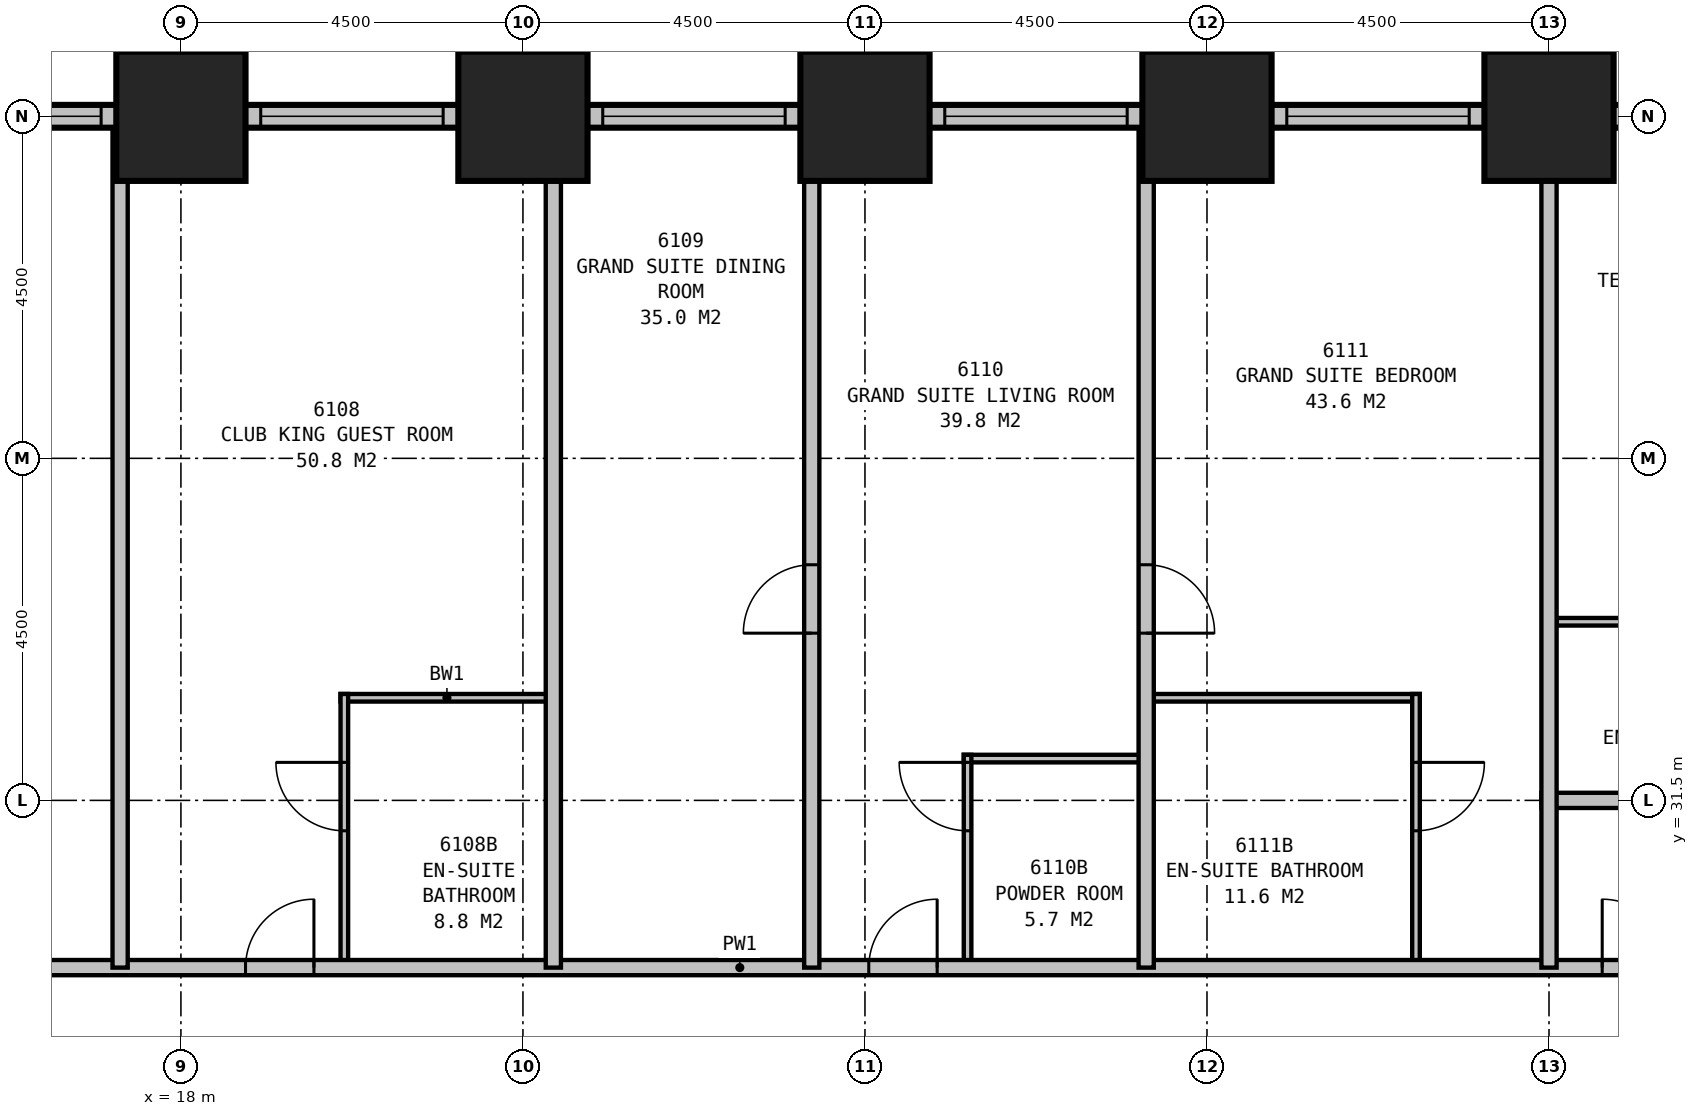
"""IFC4 building model, lengths in metres.
Left out: names, types, materials, properties, quantities, classifications, styles, units other than length and angle.
Written with IfcOpenShell. Run it as: python <this file> out.ifc"""

import sys

from ifc_helpers import new_model, si_unit, direction, frame, frame_2d, origin, origin_2d, place, context, subcontext, project, spatial, rectangle, extrude, element, fill, save


model = new_model("IFC4")
c1 = context("Model", 3, precision=1e-05, world=origin(), true_north=direction((0.0, 1.0)))
c2 = subcontext(c1, "Body", "Model", "MODEL_VIEW")
j1 = project(units=[si_unit("LENGTHUNIT", "METRE"), si_unit("PLANEANGLEUNIT", "RADIAN")], contexts=[c1])
p1 = place(None, origin())
s1 = spatial("IfcSite", under=j1, at=p1, CompositionType="ELEMENT")
p2 = place(p1, origin())
s2 = spatial("IfcBuilding", under=s1, at=p2, CompositionType="ELEMENT")
p3 = place(p2, frame((0.0, 0.0, 236.9)))
s3 = spatial("IfcBuildingStorey", under=s2, at=p3, CompositionType="ELEMENT", Elevation=236.9)
for number, where, z_axis, x_axis in (
    (1, (36.0, 40.5, 0.0), (0.0, 0.0, 1.0), (1.0, 0.0, 0.0)),
    (2, (31.5, 40.5, 0.0), (0.0, 0.0, 1.0), (1.0, 0.0, 0.0)),
    (3, (27.0, 40.5, 0.0), (0.0, 0.0, 1.0), (1.0, 0.0, 0.0)),
    (4, (22.5, 40.5, 0.0), (0.0, 0.0, 1.0), (1.0, 0.0, 0.0)),
    (5, (18.0, 40.5, 0.0), (0.0, 0.0, 1.0), (1.0, 0.0, 0.0)),
):
    element("IfcColumn", number, at=place(p3, frame(where, z_axis=z_axis, x_axis=x_axis)), inside=s3, PredefinedType="COLUMN", context=c2, shape_type="SweptSolid", body=[
        extrude(rectangle(XDim=1.7, YDim=1.7, at=origin_2d()), origin(), (0.0, 0.0, 1.0), 3.9),
    ])
p4 = place(p3, frame((40.65, 40.5, 0.0), z_axis=(0.0, 0.0, 1.0), x_axis=(-1.0, 0.0, 0.0)))
e6 = element("IfcWall", 6, at=p4, inside=s3, PredefinedType="STANDARD", context=c2, shape_type="SweptSolid", body=[
    extrude(rectangle(XDim=27.3, YDim=0.3, at=frame_2d((13.65, 0.0))), origin(), (0.0, 0.0, 1.0), 2.5),
])
p5 = place(p4, frame((1.2, 0.0, 0.5)))
e7 = element("IfcOpeningElement", 7, at=p5, cuts=e6, PredefinedType="OPENING", context=c2, shape_type="SweptSolid", body=[
    extrude(rectangle(XDim=2.4, YDim=1.85, at=frame_2d((1.2, 0.925))), frame((0.0, 0.16, 0.0), z_axis=(0.0, -1.0, 0.0), x_axis=(1.0, 0.0, 0.0)), (0.0, 0.0, 1.0), 0.32),
])
p6 = place(p4, frame((5.7, 0.0, 0.5)))
e8 = element("IfcOpeningElement", 8, at=p6, cuts=e6, PredefinedType="OPENING", context=c2, shape_type="SweptSolid", body=[
    extrude(rectangle(XDim=2.4, YDim=1.85, at=frame_2d((1.2, 0.925))), frame((0.0, 0.16, 0.0), z_axis=(0.0, -1.0, 0.0), x_axis=(1.0, 0.0, 0.0)), (0.0, 0.0, 1.0), 0.32),
])
p7 = place(p4, frame((10.2, 0.0, 0.5)))
e9 = element("IfcOpeningElement", 9, at=p7, cuts=e6, PredefinedType="OPENING", context=c2, shape_type="SweptSolid", body=[
    extrude(rectangle(XDim=2.4, YDim=1.85, at=frame_2d((1.2, 0.925))), frame((0.0, 0.16, 0.0), z_axis=(0.0, -1.0, 0.0), x_axis=(1.0, 0.0, 0.0)), (0.0, 0.0, 1.0), 0.32),
])
p8 = place(p4, frame((14.7, 0.0, 0.5)))
e10 = element("IfcOpeningElement", 10, at=p8, cuts=e6, PredefinedType="OPENING", context=c2, shape_type="SweptSolid", body=[
    extrude(rectangle(XDim=2.4, YDim=1.85, at=frame_2d((1.2, 0.925))), frame((0.0, 0.16, 0.0), z_axis=(0.0, -1.0, 0.0), x_axis=(1.0, 0.0, 0.0)), (0.0, 0.0, 1.0), 0.32),
])
p9 = place(p4, frame((19.2, 0.0, 0.5)))
e11 = element("IfcOpeningElement", 11, at=p9, cuts=e6, PredefinedType="OPENING", context=c2, shape_type="SweptSolid", body=[
    extrude(rectangle(XDim=2.4, YDim=1.85, at=frame_2d((1.2, 0.925))), frame((0.0, 0.16, 0.0), z_axis=(0.0, -1.0, 0.0), x_axis=(1.0, 0.0, 0.0)), (0.0, 0.0, 1.0), 0.32),
])
p10 = place(p4, frame((23.7, 0.0, 0.5)))
e12 = element("IfcOpeningElement", 12, at=p10, cuts=e6, PredefinedType="OPENING", context=c2, shape_type="SweptSolid", body=[
    extrude(rectangle(XDim=2.4, YDim=1.85, at=frame_2d((1.2, 0.925))), frame((0.0, 0.16, 0.0), z_axis=(0.0, -1.0, 0.0), x_axis=(1.0, 0.0, 0.0)), (0.0, 0.0, 1.0), 0.32),
])
p11 = place(p3, frame((12.406, 29.3, 0.0), z_axis=(0.0, 0.0, 1.0), x_axis=(1.0, 0.0, 0.0)))
e13 = element("IfcWall", 13, at=p11, inside=s3, PredefinedType="PARTITIONING", context=c2, shape_type="SweptSolid", body=[
    extrude(rectangle(XDim=25.894, YDim=0.2, at=frame_2d((12.947, 0.0))), origin(), (0.0, 0.0, 1.0), 3.65),
])
p12 = place(p11, frame((0.9, 0.0, 0.0)))
e14 = element("IfcOpeningElement", 14, at=p12, cuts=e13, PredefinedType="OPENING", context=c2, shape_type="SweptSolid", body=[
    extrude(rectangle(XDim=0.9, YDim=2.1, at=frame_2d((0.45, 1.05))), frame((0.0, 0.11, 0.0), z_axis=(0.0, -1.0, 0.0), x_axis=(1.0, 0.0, 0.0)), (0.0, 0.0, 1.0), 0.22),
])
p13 = place(p11, frame((6.444, 0.0, 0.0)))
e15 = element("IfcOpeningElement", 15, at=p13, cuts=e13, PredefinedType="OPENING", context=c2, shape_type="SweptSolid", body=[
    extrude(rectangle(XDim=0.9, YDim=2.1, at=frame_2d((0.45, 1.05))), frame((0.0, 0.11, 0.0), z_axis=(0.0, -1.0, 0.0), x_axis=(1.0, 0.0, 0.0)), (0.0, 0.0, 1.0), 0.22),
])
p14 = place(p11, frame((14.644, 0.0, 0.0)))
e16 = element("IfcOpeningElement", 16, at=p14, cuts=e13, PredefinedType="OPENING", context=c2, shape_type="SweptSolid", body=[
    extrude(rectangle(XDim=0.9, YDim=2.1, at=frame_2d((0.45, 1.05))), frame((0.0, 0.11, 0.0), z_axis=(0.0, -1.0, 0.0), x_axis=(1.0, 0.0, 0.0)), (0.0, 0.0, 1.0), 0.22),
])
p15 = place(p11, frame((24.293, 0.0, 0.0)))
e17 = element("IfcOpeningElement", 17, at=p15, cuts=e13, PredefinedType="OPENING", context=c2, shape_type="SweptSolid", body=[
    extrude(rectangle(XDim=0.9, YDim=2.1, at=frame_2d((0.45, 1.05))), frame((0.0, 0.11, 0.0), z_axis=(0.0, -1.0, 0.0), x_axis=(1.0, 0.0, 0.0)), (0.0, 0.0, 1.0), 0.22),
])
for number, where, z_axis, x_axis in (
    (18, (17.2, 29.3, 0.0), (0.0, 0.0, 1.0), (0.0, 1.0, 0.0)),
    (19, (22.9, 29.3, 0.0), (0.0, 0.0, 1.0), (0.0, 1.0, 0.0)),
):
    element("IfcWall", number, at=place(p3, frame(where, z_axis=z_axis, x_axis=x_axis)), inside=s3, PredefinedType="PARTITIONING", context=c2, shape_type="SweptSolid", body=[
        extrude(rectangle(XDim=11.2, YDim=0.2, at=frame_2d((5.6, 0.0))), origin(), (0.0, 0.0, 1.0), 2.65),
    ])
p16 = place(p3, frame((26.3, 29.3, 0.0), z_axis=(0.0, 0.0, 1.0), x_axis=(0.0, 1.0, 0.0)))
e20 = element("IfcWall", 20, at=p16, inside=s3, PredefinedType="PARTITIONING", context=c2, shape_type="SweptSolid", body=[
    extrude(rectangle(XDim=11.2, YDim=0.2, at=frame_2d((5.6, 0.0))), origin(), (0.0, 0.0, 1.0), 2.65),
])
p17 = place(p16, frame((4.4, 0.0, 0.0)))
e21 = element("IfcOpeningElement", 21, at=p17, cuts=e20, PredefinedType="OPENING", context=c2, shape_type="SweptSolid", body=[
    extrude(rectangle(XDim=0.9, YDim=2.1, at=frame_2d((0.45, 1.05))), frame((0.0, 0.11, 0.0), z_axis=(0.0, -1.0, 0.0), x_axis=(1.0, 0.0, 0.0)), (0.0, 0.0, 1.0), 0.22),
])
p18 = place(p3, frame((30.7, 29.3, 0.0), z_axis=(0.0, 0.0, 1.0), x_axis=(0.0, 1.0, 0.0)))
e22 = element("IfcWall", 22, at=p18, inside=s3, PredefinedType="PARTITIONING", context=c2, shape_type="SweptSolid", body=[
    extrude(rectangle(XDim=11.2, YDim=0.2, at=frame_2d((5.6, 0.0))), origin(), (0.0, 0.0, 1.0), 2.65),
])
p19 = place(p18, frame((5.3, 0.0, 0.0), z_axis=(0.0, 0.0, 1.0), x_axis=(-1.0, 0.0, 0.0)))
e23 = element("IfcOpeningElement", 23, at=p19, cuts=e22, PredefinedType="OPENING", context=c2, shape_type="SweptSolid", body=[
    extrude(rectangle(XDim=0.9, YDim=2.1, at=frame_2d((0.45, 1.05))), frame((0.0, 0.11, 0.0), z_axis=(0.0, -1.0, 0.0), x_axis=(1.0, 0.0, 0.0)), (0.0, 0.0, 1.0), 0.22),
])
p20 = place(p3, frame((20.1, 32.85, 0.0), z_axis=(0.0, 0.0, 1.0), x_axis=(1.0, 0.0, 0.0)))
e24 = element("IfcWall", 24, at=p20, inside=s3, PredefinedType="PLUMBINGWALL", context=c2, shape_type="SweptSolid", body=[
    extrude(rectangle(XDim=2.8, YDim=0.1, at=frame_2d((1.4, 0.0))), origin(), (0.0, 0.0, 1.0), 3.65),
])
p21 = place(p3, frame((20.15, 29.3, 0.0), z_axis=(0.0, 0.0, 1.0), x_axis=(0.0, 1.0, 0.0)))
e25 = element("IfcWall", 25, at=p21, inside=s3, PredefinedType="PLUMBINGWALL", context=c2, shape_type="SweptSolid", body=[
    extrude(rectangle(XDim=3.6, YDim=0.1, at=frame_2d((1.8, 0.0))), origin(), (0.0, 0.0, 1.0), 3.65),
])
p22 = place(p21, frame((1.8, 0.0, 0.0)))
e26 = element("IfcOpeningElement", 26, at=p22, cuts=e25, PredefinedType="OPENING", context=c2, shape_type="SweptSolid", body=[
    extrude(rectangle(XDim=0.9, YDim=2.1, at=frame_2d((0.45, 1.05))), frame((0.0, 0.06, 0.0), z_axis=(0.0, -1.0, 0.0), x_axis=(1.0, 0.0, 0.0)), (0.0, 0.0, 1.0), 0.12),
])
p23 = place(p3, frame((28.3, 32.05, 0.0), z_axis=(0.0, 0.0, 1.0), x_axis=(1.0, 0.0, 0.0)))
e27 = element("IfcWall", 27, at=p23, inside=s3, PredefinedType="PLUMBINGWALL", context=c2, shape_type="SweptSolid", body=[
    extrude(rectangle(XDim=2.4, YDim=0.1, at=frame_2d((1.2, 0.0))), origin(), (0.0, 0.0, 1.0), 3.65),
])
p24 = place(p3, frame((28.35, 29.3, 0.0), z_axis=(0.0, 0.0, 1.0), x_axis=(0.0, 1.0, 0.0)))
e28 = element("IfcWall", 28, at=p24, inside=s3, PredefinedType="PLUMBINGWALL", context=c2, shape_type="SweptSolid", body=[
    extrude(rectangle(XDim=2.8, YDim=0.1, at=frame_2d((1.4, 0.0))), origin(), (0.0, 0.0, 1.0), 3.65),
])
p25 = place(p24, frame((1.8, 0.0, 0.0)))
e29 = element("IfcOpeningElement", 29, at=p25, cuts=e28, PredefinedType="OPENING", context=c2, shape_type="SweptSolid", body=[
    extrude(rectangle(XDim=0.9, YDim=2.1, at=frame_2d((0.45, 1.05))), frame((0.0, 0.06, 0.0), z_axis=(0.0, -1.0, 0.0), x_axis=(1.0, 0.0, 0.0)), (0.0, 0.0, 1.0), 0.12),
])
p26 = place(p3, frame((30.7, 32.85, 0.0), z_axis=(0.0, 0.0, 1.0), x_axis=(1.0, 0.0, 0.0)))
e30 = element("IfcWall", 30, at=p26, inside=s3, PredefinedType="PLUMBINGWALL", context=c2, shape_type="SweptSolid", body=[
    extrude(rectangle(XDim=3.6, YDim=0.1, at=frame_2d((1.8, 0.0))), origin(), (0.0, 0.0, 1.0), 3.65),
])
p27 = place(p3, frame((34.25, 29.3, 0.0), z_axis=(0.0, 0.0, 1.0), x_axis=(0.0, 1.0, 0.0)))
e31 = element("IfcWall", 31, at=p27, inside=s3, PredefinedType="PLUMBINGWALL", context=c2, shape_type="SweptSolid", body=[
    extrude(rectangle(XDim=3.6, YDim=0.1, at=frame_2d((1.8, 0.0))), origin(), (0.0, 0.0, 1.0), 3.65),
])
p28 = place(p27, frame((2.7, 0.0, 0.0), z_axis=(0.0, 0.0, 1.0), x_axis=(-1.0, 0.0, 0.0)))
e32 = element("IfcOpeningElement", 32, at=p28, cuts=e31, PredefinedType="OPENING", context=c2, shape_type="SweptSolid", body=[
    extrude(rectangle(XDim=0.9, YDim=2.1, at=frame_2d((0.45, 1.05))), frame((0.0, 0.06, 0.0), z_axis=(0.0, -1.0, 0.0), x_axis=(1.0, 0.0, 0.0)), (0.0, 0.0, 1.0), 0.12),
])
p29 = place(p3, frame((36.0, 29.3, 0.0), z_axis=(0.0, 0.0, 1.0), x_axis=(0.0, 1.0, 0.0)))
e33 = element("IfcWall", 33, at=p29, inside=s3, PredefinedType="PARTITIONING", context=c2, shape_type="SweptSolid", body=[
    extrude(rectangle(XDim=11.2, YDim=0.2, at=frame_2d((5.6, 0.0))), origin(), (0.0, 0.0, 1.0), 2.65),
])
p30 = place(p3, frame((35.9, 31.5, 0.0), z_axis=(0.0, 0.0, 1.0), x_axis=(1.0, 0.0, 0.0)))
e34 = element("IfcWall", 34, at=p30, inside=s3, PredefinedType="PARTITIONING", context=c2, shape_type="SweptSolid", body=[
    extrude(rectangle(XDim=10.099, YDim=0.2, at=frame_2d((5.05, 0.0))), origin(), (0.0, 0.0, 1.0), 3.65),
])
p31 = place(p30, frame((8.099, 0.0, 0.0)))
e35 = element("IfcOpeningElement", 35, at=p31, cuts=e34, PredefinedType="OPENING", context=c2, shape_type="SweptSolid", body=[
    extrude(rectangle(XDim=0.9, YDim=2.1, at=frame_2d((0.45, 1.05))), frame((0.0, 0.11, 0.0), z_axis=(0.0, -1.0, 0.0), x_axis=(1.0, 0.0, 0.0)), (0.0, 0.0, 1.0), 0.22),
])
p32 = place(p3, frame((36.1, 33.85, 0.0), z_axis=(0.0, 0.0, 1.0), x_axis=(1.0, 0.0, 0.0)))
e36 = element("IfcWall", 36, at=p32, inside=s3, PredefinedType="PLUMBINGWALL", context=c2, shape_type="SweptSolid", body=[
    extrude(rectangle(XDim=3.5, YDim=0.1, at=frame_2d((1.75, 0.0))), origin(), (0.0, 0.0, 1.0), 3.65),
])
p33 = place(p32, frame((0.9, 0.0, 0.0)))
e37 = element("IfcOpeningElement", 37, at=p33, cuts=e36, PredefinedType="OPENING", context=c2, shape_type="SweptSolid", body=[
    extrude(rectangle(XDim=0.9, YDim=2.1, at=frame_2d((0.45, 1.05))), frame((0.0, 0.06, 0.0), z_axis=(0.0, -1.0, 0.0), x_axis=(1.0, 0.0, 0.0)), (0.0, 0.0, 1.0), 0.12),
])
p34 = place(p6, origin())
e38 = element("IfcWindow", 38, at=p34, inside=s3, PartitioningType="SINGLE_PANEL", PredefinedType="WINDOW", context=c2, shape_type="SweptSolid", body=[
    extrude(rectangle(XDim=2.4, YDim=1.85, at=frame_2d((1.2, 0.925))), frame((0.0, 0.03, 0.0), z_axis=(0.0, -1.0, 0.0), x_axis=(1.0, 0.0, 0.0)), (0.0, 0.0, 1.0), 0.06),
])
fill(e8, e38)
p35 = place(p7, origin())
e39 = element("IfcWindow", 39, at=p35, inside=s3, PartitioningType="SINGLE_PANEL", PredefinedType="WINDOW", context=c2, shape_type="SweptSolid", body=[
    extrude(rectangle(XDim=2.4, YDim=1.85, at=frame_2d((1.2, 0.925))), frame((0.0, 0.03, 0.0), z_axis=(0.0, -1.0, 0.0), x_axis=(1.0, 0.0, 0.0)), (0.0, 0.0, 1.0), 0.06),
])
fill(e9, e39)
p36 = place(p8, origin())
e40 = element("IfcWindow", 40, at=p36, inside=s3, PartitioningType="SINGLE_PANEL", PredefinedType="WINDOW", context=c2, shape_type="SweptSolid", body=[
    extrude(rectangle(XDim=2.4, YDim=1.85, at=frame_2d((1.2, 0.925))), frame((0.0, 0.03, 0.0), z_axis=(0.0, -1.0, 0.0), x_axis=(1.0, 0.0, 0.0)), (0.0, 0.0, 1.0), 0.06),
])
fill(e10, e40)
p37 = place(p9, origin())
e41 = element("IfcWindow", 41, at=p37, inside=s3, PartitioningType="SINGLE_PANEL", PredefinedType="WINDOW", context=c2, shape_type="SweptSolid", body=[
    extrude(rectangle(XDim=2.4, YDim=1.85, at=frame_2d((1.2, 0.925))), frame((0.0, 0.03, 0.0), z_axis=(0.0, -1.0, 0.0), x_axis=(1.0, 0.0, 0.0)), (0.0, 0.0, 1.0), 0.06),
])
fill(e11, e41)
p38 = place(p10, origin())
e42 = element("IfcWindow", 42, at=p38, inside=s3, PartitioningType="SINGLE_PANEL", PredefinedType="WINDOW", context=c2, shape_type="SweptSolid", body=[
    extrude(rectangle(XDim=2.4, YDim=1.85, at=frame_2d((1.2, 0.925))), frame((0.0, 0.03, 0.0), z_axis=(0.0, -1.0, 0.0), x_axis=(1.0, 0.0, 0.0)), (0.0, 0.0, 1.0), 0.06),
])
fill(e12, e42)
p39 = place(p13, origin())
e43 = element("IfcDoor", 43, at=p39, inside=s3, OperationType="SINGLE_SWING_RIGHT", PredefinedType="DOOR", context=c2, shape_type="SweptSolid", body=[
    extrude(rectangle(XDim=0.9, YDim=2.1, at=frame_2d((0.45, 1.05))), frame((0.0, 0.025, 0.0), z_axis=(0.0, -1.0, 0.0), x_axis=(1.0, 0.0, 0.0)), (0.0, 0.0, 1.0), 0.05),
])
fill(e15, e43)
p40 = place(p14, origin())
e44 = element("IfcDoor", 44, at=p40, inside=s3, OperationType="SINGLE_SWING_RIGHT", PredefinedType="DOOR", context=c2, shape_type="SweptSolid", body=[
    extrude(rectangle(XDim=0.9, YDim=2.1, at=frame_2d((0.45, 1.05))), frame((0.0, 0.025, 0.0), z_axis=(0.0, -1.0, 0.0), x_axis=(1.0, 0.0, 0.0)), (0.0, 0.0, 1.0), 0.05),
])
fill(e16, e44)
p41 = place(p15, origin())
e45 = element("IfcDoor", 45, at=p41, inside=s3, OperationType="SINGLE_SWING_LEFT", PredefinedType="DOOR", context=c2, shape_type="SweptSolid", body=[
    extrude(rectangle(XDim=0.9, YDim=2.1, at=frame_2d((0.45, 1.05))), frame((0.0, 0.025, 0.0), z_axis=(0.0, -1.0, 0.0), x_axis=(1.0, 0.0, 0.0)), (0.0, 0.0, 1.0), 0.05),
])
fill(e17, e45)
p42 = place(p17, origin())
e46 = element("IfcDoor", 46, at=p42, inside=s3, OperationType="SINGLE_SWING_LEFT", PredefinedType="DOOR", context=c2, shape_type="SweptSolid", body=[
    extrude(rectangle(XDim=0.9, YDim=2.1, at=frame_2d((0.45, 1.05))), frame((0.0, 0.025, 0.0), z_axis=(0.0, -1.0, 0.0), x_axis=(1.0, 0.0, 0.0)), (0.0, 0.0, 1.0), 0.05),
])
fill(e21, e46)
p43 = place(p19, origin())
e47 = element("IfcDoor", 47, at=p43, inside=s3, OperationType="SINGLE_SWING_RIGHT", PredefinedType="DOOR", context=c2, shape_type="SweptSolid", body=[
    extrude(rectangle(XDim=0.9, YDim=2.1, at=frame_2d((0.45, 1.05))), frame((0.0, 0.025, 0.0), z_axis=(0.0, -1.0, 0.0), x_axis=(1.0, 0.0, 0.0)), (0.0, 0.0, 1.0), 0.05),
])
fill(e23, e47)
p44 = place(p22, origin())
e48 = element("IfcDoor", 48, at=p44, inside=s3, OperationType="SINGLE_SWING_RIGHT", PredefinedType="DOOR", context=c2, shape_type="SweptSolid", body=[
    extrude(rectangle(XDim=0.9, YDim=2.1, at=frame_2d((0.45, 1.05))), frame((0.0, 0.025, 0.0), z_axis=(0.0, -1.0, 0.0), x_axis=(1.0, 0.0, 0.0)), (0.0, 0.0, 1.0), 0.05),
])
fill(e26, e48)
p45 = place(p25, origin())
e49 = element("IfcDoor", 49, at=p45, inside=s3, OperationType="SINGLE_SWING_RIGHT", PredefinedType="DOOR", context=c2, shape_type="SweptSolid", body=[
    extrude(rectangle(XDim=0.9, YDim=2.1, at=frame_2d((0.45, 1.05))), frame((0.0, 0.025, 0.0), z_axis=(0.0, -1.0, 0.0), x_axis=(1.0, 0.0, 0.0)), (0.0, 0.0, 1.0), 0.05),
])
fill(e29, e49)
p46 = place(p28, origin())
e50 = element("IfcDoor", 50, at=p46, inside=s3, OperationType="SINGLE_SWING_LEFT", PredefinedType="DOOR", context=c2, shape_type="SweptSolid", body=[
    extrude(rectangle(XDim=0.9, YDim=2.1, at=frame_2d((0.45, 1.05))), frame((0.0, 0.025, 0.0), z_axis=(0.0, -1.0, 0.0), x_axis=(1.0, 0.0, 0.0)), (0.0, 0.0, 1.0), 0.05),
])
fill(e32, e50)
save(model, sys.argv[1])
